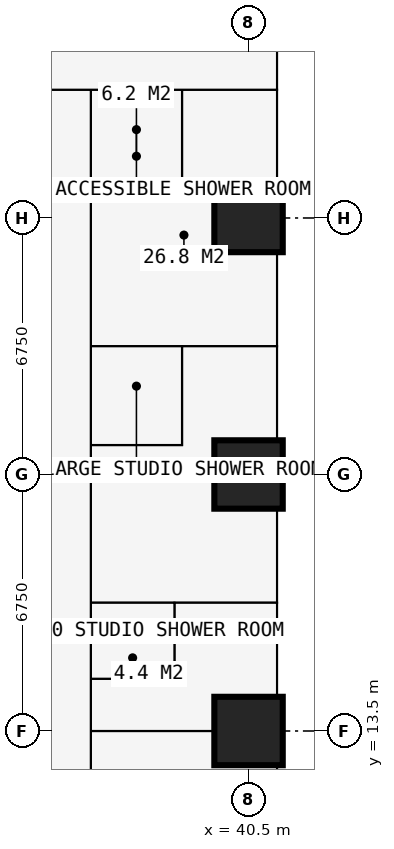
"""IFC4 building model, lengths in metres.
Left out: names, types, materials, properties, quantities, classifications, styles, units other than length and angle.
Written with IfcOpenShell. Run it as: python <this file> out.ifc"""

import sys

from ifc_helpers import new_model, si_unit, direction, frame, frame_2d, origin, origin_2d, place, context, subcontext, project, spatial, rectangle, extrude, element, fill, save


model = new_model("IFC4")
c1 = context("Model", 3, precision=1e-05, world=origin(), true_north=direction((0.0, 1.0)))
c2 = subcontext(c1, "Body", "Model", "MODEL_VIEW")
j1 = project(units=[si_unit("LENGTHUNIT", "METRE"), si_unit("PLANEANGLEUNIT", "RADIAN")], contexts=[c1])
p1 = place(None, origin())
s1 = spatial("IfcSite", under=j1, at=p1, CompositionType="ELEMENT")
p2 = place(p1, origin())
s2 = spatial("IfcBuilding", under=s1, at=p2, CompositionType="ELEMENT")
p3 = place(p2, frame((0.0, 0.0, 64.8)))
s3 = spatial("IfcBuildingStorey", under=s2, at=p3, CompositionType="ELEMENT", Elevation=64.8)
for number, where, z_axis, x_axis in (
    (1, (40.5, 13.5, 0.0), (0.0, 0.0, 1.0), (1.0, 0.0, 0.0)),
    (2, (40.5, 20.25, 0.0), (0.0, 0.0, 1.0), (1.0, 0.0, 0.0)),
    (3, (40.5, 27.0, 0.0), (0.0, 0.0, 1.0), (1.0, 0.0, 0.0)),
):
    element("IfcColumn", number, at=place(p3, frame(where, z_axis=z_axis, x_axis=x_axis)), inside=s3, PredefinedType="COLUMN", context=c2, shape_type="SweptSolid", body=[
        extrude(rectangle(XDim=1.8, YDim=1.8, at=origin_2d()), origin(), (0.0, 0.0, 1.0), 3.6),
    ])
p4 = place(p3, frame((41.25, 27.0, 0.0), z_axis=(0.0, 0.0, 1.0), x_axis=(0.0, -1.0, 0.0)))
e4 = element("IfcWall", 4, at=p4, inside=s3, PredefinedType="SOLIDWALL", context=c2, shape_type="SweptSolid", body=[
    extrude(rectangle(XDim=6.75, YDim=0.15, at=frame_2d((3.375, 0.0))), origin(), (0.0, 0.0, 1.0), 3.375),
])
p5 = place(p4, frame((0.962, 0.0, 0.0)))
e5 = element("IfcOpeningElement", 5, at=p5, cuts=e4, PredefinedType="OPENING", context=c2, shape_type="SweptSolid", body=[
    extrude(rectangle(XDim=1.0, YDim=2.2, at=frame_2d((0.5, 1.1))), frame((0.0, 0.085, 0.0), z_axis=(0.0, -1.0, 0.0), x_axis=(1.0, 0.0, 0.0)), (0.0, 0.0, 1.0), 0.17),
])
p6 = place(p4, frame((2.025, 0.0, 0.9)))
e6 = element("IfcOpeningElement", 6, at=p6, cuts=e4, PredefinedType="OPENING", context=c2, shape_type="SweptSolid", body=[
    extrude(rectangle(XDim=1.2, YDim=1.8, at=frame_2d((0.6, 0.9))), frame((0.0, 0.085, 0.0), z_axis=(0.0, -1.0, 0.0), x_axis=(1.0, 0.0, 0.0)), (0.0, 0.0, 1.0), 0.17),
])
p7 = place(p4, frame((4.788, 0.0, 0.0)))
e7 = element("IfcOpeningElement", 7, at=p7, cuts=e4, PredefinedType="OPENING", context=c2, shape_type="SweptSolid", body=[
    extrude(rectangle(XDim=1.0, YDim=2.2, at=frame_2d((0.5, 1.1))), frame((0.0, 0.085, 0.0), z_axis=(0.0, -1.0, 0.0), x_axis=(1.0, 0.0, 0.0)), (0.0, 0.0, 1.0), 0.17),
])
p8 = place(p4, frame((3.525, 0.0, 0.9)))
e8 = element("IfcOpeningElement", 8, at=p8, cuts=e4, PredefinedType="OPENING", context=c2, shape_type="SweptSolid", body=[
    extrude(rectangle(XDim=1.2, YDim=1.8, at=frame_2d((0.6, 0.9))), frame((0.0, 0.085, 0.0), z_axis=(0.0, -1.0, 0.0), x_axis=(1.0, 0.0, 0.0)), (0.0, 0.0, 1.0), 0.17),
])
p9 = place(p3, frame((41.35, 23.625, 0.0), z_axis=(0.0, 0.0, 1.0), x_axis=(1.0, 0.0, 0.0)))
e9 = element("IfcWall", 9, at=p9, inside=s3, PredefinedType="USERDEFINED", context=c2, shape_type="SweptSolid", body=[
    extrude(rectangle(XDim=2.2, YDim=1.0, at=frame_2d((1.1, 0.0))), origin(), (0.0, 0.0, 1.0), 0.9),
])
p10 = place(p3, frame((30.375, 30.375, 0.0), z_axis=(0.0, 0.0, 1.0), x_axis=(1.0, 0.0, 0.0)))
e10 = element("IfcWall", 10, at=p10, inside=s3, PredefinedType="PARTITIONING", context=c2, shape_type="SweptSolid", body=[
    extrude(rectangle(XDim=10.859, YDim=0.15, at=frame_2d((5.429, 0.0))), origin(), (0.0, 0.0, 1.0), 3.375),
])
p11 = place(p10, frame((4.725, 0.0, 0.0)))
e11 = element("IfcOpeningElement", 11, at=p11, cuts=e10, PredefinedType="OPENING", context=c2, shape_type="SweptSolid", body=[
    extrude(rectangle(XDim=1.0, YDim=2.2, at=frame_2d((0.5, 1.1))), frame((0.0, 0.085, 0.0), z_axis=(0.0, -1.0, 0.0), x_axis=(1.0, 0.0, 0.0)), (0.0, 0.0, 1.0), 0.17),
])
p12 = place(p3, frame((36.35, 6.75, 0.0), z_axis=(0.0, 0.0, 1.0), x_axis=(0.0, 1.0, 0.0)))
e12 = element("IfcWall", 12, at=p12, inside=s3, PredefinedType="PARTITIONING", context=c2, shape_type="SweptSolid", body=[
    extrude(rectangle(XDim=23.625, YDim=0.15, at=frame_2d((11.812, 0.0))), origin(), (0.0, 0.0, 1.0), 3.375),
])
p13 = place(p12, frame((18.475, 0.0, 0.0)))
e13 = element("IfcOpeningElement", 13, at=p13, cuts=e12, PredefinedType="OPENING", context=c2, shape_type="SweptSolid", body=[
    extrude(rectangle(XDim=0.95, YDim=2.2, at=frame_2d((0.475, 1.1))), frame((0.0, 0.085, 0.0), z_axis=(0.0, -1.0, 0.0), x_axis=(1.0, 0.0, 0.0)), (0.0, 0.0, 1.0), 0.17),
])
p14 = place(p12, frame((11.725, 0.0, 0.0)))
e14 = element("IfcOpeningElement", 14, at=p14, cuts=e12, PredefinedType="OPENING", context=c2, shape_type="SweptSolid", body=[
    extrude(rectangle(XDim=0.95, YDim=2.2, at=frame_2d((0.475, 1.1))), frame((0.0, 0.085, 0.0), z_axis=(0.0, -1.0, 0.0), x_axis=(1.0, 0.0, 0.0)), (0.0, 0.0, 1.0), 0.17),
])
p15 = place(p12, frame((6.95, 0.0, 0.0)))
e15 = element("IfcOpeningElement", 15, at=p15, cuts=e12, PredefinedType="OPENING", context=c2, shape_type="SweptSolid", body=[
    extrude(rectangle(XDim=0.95, YDim=2.2, at=frame_2d((0.475, 1.1))), frame((0.0, 0.085, 0.0), z_axis=(0.0, -1.0, 0.0), x_axis=(1.0, 0.0, 0.0)), (0.0, 0.0, 1.0), 0.17),
])
p16 = place(p3, frame((36.35, 13.5, 0.0), z_axis=(0.0, 0.0, 1.0), x_axis=(1.0, 0.0, 0.0)))
e16 = element("IfcWall", 16, at=p16, inside=s3, PredefinedType="PARTITIONING", context=c2, shape_type="SweptSolid", body=[
    extrude(rectangle(XDim=4.884, YDim=0.15, at=frame_2d((2.442, 0.0))), origin(), (0.0, 0.0, 1.0), 2.61),
])
p17 = place(p3, frame((36.35, 14.875, 0.0), z_axis=(0.0, 0.0, 1.0), x_axis=(1.0, 0.0, 0.0)))
e17 = element("IfcWall", 17, at=p17, inside=s3, PredefinedType="PARTITIONING", context=c2, shape_type="SweptSolid", body=[
    extrude(rectangle(XDim=2.2, YDim=0.1, at=frame_2d((1.1, 0.0))), origin(), (0.0, 0.0, 1.0), 3.375),
])
p18 = place(p3, frame((36.35, 16.875, 0.0), z_axis=(0.0, 0.0, 1.0), x_axis=(1.0, 0.0, 0.0)))
e18 = element("IfcWall", 18, at=p18, inside=s3, PredefinedType="PARTITIONING", context=c2, shape_type="SweptSolid", body=[
    extrude(rectangle(XDim=4.884, YDim=0.175, at=frame_2d((2.442, 0.0))), origin(), (0.0, 0.0, 1.0), 3.375),
])
p19 = place(p18, frame((0.65, 0.0, 0.0)))
e19 = element("IfcOpeningElement", 19, at=p19, cuts=e18, PredefinedType="OPENING", context=c2, shape_type="SweptSolid", body=[
    extrude(rectangle(XDim=0.9, YDim=2.2, at=frame_2d((0.45, 1.1))), frame((0.0, 0.097, 0.0), z_axis=(0.0, -1.0, 0.0), x_axis=(1.0, 0.0, 0.0)), (0.0, 0.0, 1.0), 0.195),
])
p20 = place(p3, frame((36.35, 21.025, 0.0), z_axis=(0.0, 0.0, 1.0), x_axis=(1.0, 0.0, 0.0)))
e20 = element("IfcWall", 20, at=p20, inside=s3, PredefinedType="PARTITIONING", context=c2, shape_type="SweptSolid", body=[
    extrude(rectangle(XDim=2.4, YDim=0.1, at=frame_2d((1.2, 0.0))), origin(), (0.0, 0.0, 1.0), 3.375),
])
p21 = place(p3, frame((36.35, 23.625, 0.0), z_axis=(0.0, 0.0, 1.0), x_axis=(1.0, 0.0, 0.0)))
e21 = element("IfcWall", 21, at=p21, inside=s3, PredefinedType="PARTITIONING", context=c2, shape_type="SweptSolid", body=[
    extrude(rectangle(XDim=4.884, YDim=0.175, at=frame_2d((2.442, 0.0))), origin(), (0.0, 0.0, 1.0), 3.375),
])
p22 = place(p21, frame((0.75, 0.0, 0.0)))
e22 = element("IfcOpeningElement", 22, at=p22, cuts=e21, PredefinedType="OPENING", context=c2, shape_type="SweptSolid", body=[
    extrude(rectangle(XDim=0.9, YDim=2.2, at=frame_2d((0.45, 1.1))), frame((0.0, 0.097, 0.0), z_axis=(0.0, -1.0, 0.0), x_axis=(1.0, 0.0, 0.0)), (0.0, 0.0, 1.0), 0.195),
])
p23 = place(p3, frame((36.35, 27.775, 0.0), z_axis=(0.0, 0.0, 1.0), x_axis=(1.0, 0.0, 0.0)))
e23 = element("IfcWall", 23, at=p23, inside=s3, PredefinedType="PARTITIONING", context=c2, shape_type="SweptSolid", body=[
    extrude(rectangle(XDim=2.4, YDim=0.1, at=frame_2d((1.2, 0.0))), origin(), (0.0, 0.0, 1.0), 3.375),
])
p24 = place(p3, frame((38.55, 14.875, 0.0), z_axis=(0.0, 0.0, 1.0), x_axis=(0.0, 1.0, 0.0)))
e24 = element("IfcWall", 24, at=p24, inside=s3, PredefinedType="PARTITIONING", context=c2, shape_type="SweptSolid", body=[
    extrude(rectangle(XDim=2.0, YDim=0.1, at=frame_2d((1.0, 0.0))), origin(), (0.0, 0.0, 1.0), 3.375),
])
p25 = place(p3, frame((38.75, 21.025, 0.0), z_axis=(0.0, 0.0, 1.0), x_axis=(0.0, 1.0, 0.0)))
e25 = element("IfcWall", 25, at=p25, inside=s3, PredefinedType="PARTITIONING", context=c2, shape_type="SweptSolid", body=[
    extrude(rectangle(XDim=2.6, YDim=0.1, at=frame_2d((1.3, 0.0))), origin(), (0.0, 0.0, 1.0), 3.375),
])
p26 = place(p3, frame((38.75, 27.775, 0.0), z_axis=(0.0, 0.0, 1.0), x_axis=(0.0, 1.0, 0.0)))
e26 = element("IfcWall", 26, at=p26, inside=s3, PredefinedType="PARTITIONING", context=c2, shape_type="SweptSolid", body=[
    extrude(rectangle(XDim=2.6, YDim=0.1, at=frame_2d((1.3, 0.0))), origin(), (0.0, 0.0, 1.0), 3.375),
])
p27 = place(p26, frame((0.85, 0.0, 0.0)))
e27 = element("IfcOpeningElement", 27, at=p27, cuts=e26, PredefinedType="OPENING", context=c2, shape_type="SweptSolid", body=[
    extrude(rectangle(XDim=0.9, YDim=2.2, at=frame_2d((0.45, 1.1))), frame((0.0, 0.06, 0.0), z_axis=(0.0, -1.0, 0.0), x_axis=(1.0, 0.0, 0.0)), (0.0, 0.0, 1.0), 0.12),
])
p28 = place(p5, origin())
e28 = element("IfcDoor", 28, at=p28, inside=s3, OperationType="SINGLE_SWING_LEFT", PredefinedType="DOOR", context=c2, shape_type="SweptSolid", body=[
    extrude(rectangle(XDim=1.0, YDim=2.2, at=frame_2d((0.5, 1.1))), frame((0.0, 0.025, 0.0), z_axis=(0.0, -1.0, 0.0), x_axis=(1.0, 0.0, 0.0)), (0.0, 0.0, 1.0), 0.05),
])
fill(e5, e28)
p29 = place(p6, origin())
e29 = element("IfcWindow", 29, at=p29, inside=s3, PartitioningType="SINGLE_PANEL", PredefinedType="WINDOW", context=c2, shape_type="SweptSolid", body=[
    extrude(rectangle(XDim=1.2, YDim=1.8, at=frame_2d((0.6, 0.9))), frame((0.0, 0.03, 0.0), z_axis=(0.0, -1.0, 0.0), x_axis=(1.0, 0.0, 0.0)), (0.0, 0.0, 1.0), 0.06),
])
fill(e6, e29)
p30 = place(p7, origin())
e30 = element("IfcDoor", 30, at=p30, inside=s3, OperationType="SINGLE_SWING_RIGHT", PredefinedType="DOOR", context=c2, shape_type="SweptSolid", body=[
    extrude(rectangle(XDim=1.0, YDim=2.2, at=frame_2d((0.5, 1.1))), frame((0.0, 0.025, 0.0), z_axis=(0.0, -1.0, 0.0), x_axis=(1.0, 0.0, 0.0)), (0.0, 0.0, 1.0), 0.05),
])
fill(e7, e30)
p31 = place(p8, origin())
e31 = element("IfcWindow", 31, at=p31, inside=s3, PartitioningType="SINGLE_PANEL", PredefinedType="WINDOW", context=c2, shape_type="SweptSolid", body=[
    extrude(rectangle(XDim=1.2, YDim=1.8, at=frame_2d((0.6, 0.9))), frame((0.0, 0.03, 0.0), z_axis=(0.0, -1.0, 0.0), x_axis=(1.0, 0.0, 0.0)), (0.0, 0.0, 1.0), 0.06),
])
fill(e8, e31)
p32 = place(p13, origin())
e32 = element("IfcDoor", 32, at=p32, inside=s3, OperationType="SINGLE_SWING_LEFT", PredefinedType="DOOR", context=c2, shape_type="SweptSolid", body=[
    extrude(rectangle(XDim=0.95, YDim=2.2, at=frame_2d((0.475, 1.1))), frame((0.0, 0.025, 0.0), z_axis=(0.0, -1.0, 0.0), x_axis=(1.0, 0.0, 0.0)), (0.0, 0.0, 1.0), 0.05),
])
fill(e13, e32)
p33 = place(p27, origin())
e33 = element("IfcDoor", 33, at=p33, inside=s3, OperationType="SINGLE_SWING_RIGHT", PredefinedType="DOOR", context=c2, shape_type="SweptSolid", body=[
    extrude(rectangle(XDim=0.9, YDim=2.2, at=frame_2d((0.45, 1.1))), frame((0.0, 0.025, 0.0), z_axis=(0.0, -1.0, 0.0), x_axis=(1.0, 0.0, 0.0)), (0.0, 0.0, 1.0), 0.05),
])
fill(e27, e33)
p34 = place(p14, origin())
e34 = element("IfcDoor", 34, at=p34, inside=s3, OperationType="SINGLE_SWING_LEFT", PredefinedType="DOOR", context=c2, shape_type="SweptSolid", body=[
    extrude(rectangle(XDim=0.95, YDim=2.2, at=frame_2d((0.475, 1.1))), frame((0.0, 0.025, 0.0), z_axis=(0.0, -1.0, 0.0), x_axis=(1.0, 0.0, 0.0)), (0.0, 0.0, 1.0), 0.05),
])
fill(e14, e34)
p35 = place(p22, origin())
e35 = element("IfcDoor", 35, at=p35, inside=s3, OperationType="SINGLE_SWING_RIGHT", PredefinedType="DOOR", context=c2, shape_type="SweptSolid", body=[
    extrude(rectangle(XDim=0.9, YDim=2.2, at=frame_2d((0.45, 1.1))), frame((0.0, 0.025, 0.0), z_axis=(0.0, -1.0, 0.0), x_axis=(1.0, 0.0, 0.0)), (0.0, 0.0, 1.0), 0.05),
])
fill(e22, e35)
p36 = place(p15, origin())
e36 = element("IfcDoor", 36, at=p36, inside=s3, OperationType="SINGLE_SWING_LEFT", PredefinedType="DOOR", context=c2, shape_type="SweptSolid", body=[
    extrude(rectangle(XDim=0.95, YDim=2.2, at=frame_2d((0.475, 1.1))), frame((0.0, 0.025, 0.0), z_axis=(0.0, -1.0, 0.0), x_axis=(1.0, 0.0, 0.0)), (0.0, 0.0, 1.0), 0.05),
])
fill(e15, e36)
p37 = place(p19, origin())
e37 = element("IfcDoor", 37, at=p37, inside=s3, OperationType="SINGLE_SWING_RIGHT", PredefinedType="DOOR", context=c2, shape_type="SweptSolid", body=[
    extrude(rectangle(XDim=0.9, YDim=2.2, at=frame_2d((0.45, 1.1))), frame((0.0, 0.025, 0.0), z_axis=(0.0, -1.0, 0.0), x_axis=(1.0, 0.0, 0.0)), (0.0, 0.0, 1.0), 0.05),
])
fill(e19, e37)
p38 = place(p11, origin())
e38 = element("IfcDoor", 38, at=p38, inside=s3, OperationType="SINGLE_SWING_LEFT", PredefinedType="DOOR", context=c2, shape_type="SweptSolid", body=[
    extrude(rectangle(XDim=1.0, YDim=2.2, at=frame_2d((0.5, 1.1))), frame((0.0, 0.025, 0.0), z_axis=(0.0, -1.0, 0.0), x_axis=(1.0, 0.0, 0.0)), (0.0, 0.0, 1.0), 0.05),
])
fill(e11, e38)
save(model, sys.argv[1])
